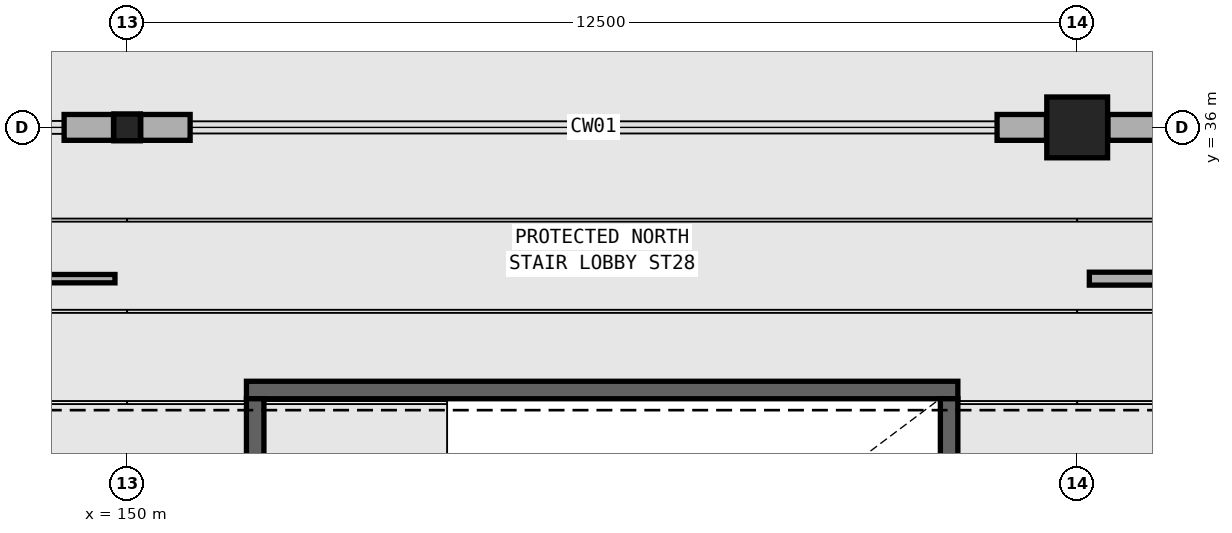
"""IFC4 building model, lengths in metres.
Left out: names, types, materials, properties, quantities, classifications, styles, units other than length and angle.
Written with IfcOpenShell. Run it as: python <this file> out.ifc"""

import sys

from ifc_helpers import new_model, si_unit, direction, frame, frame_2d, origin, origin_2d, place, context, subcontext, project, spatial, rectangle, hollow_rectangle, extrude, element, save


model = new_model("IFC4")
c1 = context("Model", 3, precision=1e-05, world=origin(), true_north=direction((0.0, 1.0)))
c2 = subcontext(c1, "Body", "Model", "MODEL_VIEW")
j1 = project(units=[si_unit("LENGTHUNIT", "METRE"), si_unit("PLANEANGLEUNIT", "RADIAN")], contexts=[c1])
p1 = place(None, origin())
s1 = spatial("IfcSite", under=j1, at=p1, CompositionType="ELEMENT")
p2 = place(p1, origin())
s2 = spatial("IfcBuilding", under=s1, at=p2, CompositionType="ELEMENT")
p3 = place(p2, frame((0.0, 0.0, 15.3)))
s3 = spatial("IfcBuildingStorey", under=s2, at=p3, CompositionType="ELEMENT", Elevation=15.3)
p4 = place(p3, frame((150.0, 36.0, 0.0), z_axis=(0.0, 0.0, 1.0), x_axis=(1.0, 0.0, 0.0)))
e1 = element("IfcColumn", 1, at=p4, inside=s3, PredefinedType="COLUMN", context=c2, shape_type="SweptSolid", body=[
    extrude(hollow_rectangle(XDim=0.35, YDim=0.35, WallThickness=0.016, InnerFilletRadius=0.016, OuterFilletRadius=0.032, at=origin_2d()), origin(), (0.0, 0.0, 1.0), 5.1),
])
p5 = place(p3, frame((162.5, 36.0, 0.0), z_axis=(0.0, 0.0, 1.0), x_axis=(1.0, 0.0, 0.0)))
e2 = element("IfcColumn", 2, at=p5, inside=s3, PredefinedType="COLUMN", context=c2, shape_type="SweptSolid", body=[
    extrude(rectangle(XDim=0.8, YDim=0.8, at=origin_2d()), origin(), (0.0, 0.0, 1.0), 5.1),
])
p6 = place(p3, frame((149.171, 36.0, 0.0), z_axis=(0.0, 0.0, 1.0), x_axis=(1.0, 0.0, 0.0)))
e3 = element("IfcWall", 3, at=p6, inside=s3, PredefinedType="SOLIDWALL", context=c2, shape_type="SweptSolid", body=[
    extrude(rectangle(XDim=0.65, YDim=0.34, at=frame_2d((0.325, 0.0))), origin(), (0.0, 0.0, 1.0), 4.172),
])
p7 = place(p3, frame((150.179, 36.0, 0.0), z_axis=(0.0, 0.0, 1.0), x_axis=(1.0, 0.0, 0.0)))
e4 = element("IfcWall", 4, at=p7, inside=s3, PredefinedType="SOLIDWALL", context=c2, shape_type="SweptSolid", body=[
    extrude(rectangle(XDim=0.65, YDim=0.34, at=frame_2d((0.325, 0.0))), origin(), (0.0, 0.0, 1.0), 4.06),
])
p8 = place(p3, frame((161.446, 36.0, 0.0), z_axis=(0.0, 0.0, 1.0), x_axis=(1.0, 0.0, 0.0)))
e5 = element("IfcWall", 5, at=p8, inside=s3, PredefinedType="SOLIDWALL", context=c2, shape_type="SweptSolid", body=[
    extrude(rectangle(XDim=0.65, YDim=0.34, at=frame_2d((0.325, 0.0))), origin(), (0.0, 0.0, 1.0), 4.06),
])
p9 = place(p3, frame((162.904, 36.0, 0.0), z_axis=(0.0, 0.0, 1.0), x_axis=(1.0, 0.0, 0.0)))
e6 = element("IfcWall", 6, at=p9, inside=s3, PredefinedType="SOLIDWALL", context=c2, shape_type="SweptSolid", body=[
    extrude(rectangle(XDim=0.65, YDim=0.34, at=frame_2d((0.325, 0.0))), origin(), (0.0, 0.0, 1.0), 4.16),
])
p10 = place(p3, frame((151.57, 32.545, 0.0), z_axis=(0.0, 0.0, 1.0), x_axis=(1.0, 0.0, 0.0)))
e7 = element("IfcWall", 7, at=p10, inside=s3, PredefinedType="SHEAR", context=c2, shape_type="SweptSolid", body=[
    extrude(rectangle(XDim=9.36, YDim=0.23, at=frame_2d((4.68, 0.0))), origin(), (0.0, 0.0, 1.0), 4.86),
])
for number, where, z_axis, x_axis in (
    (8, (151.685, 27.57, 0.0), (0.0, 0.0, 1.0), (0.0, 1.0, 0.0)),
    (9, (160.815, 27.57, 0.0), (0.0, 0.0, 1.0), (0.0, 1.0, 0.0)),
):
    element("IfcWall", number, at=place(p3, frame(where, z_axis=z_axis, x_axis=x_axis)), inside=s3, PredefinedType="SHEAR", context=c2, shape_type="SweptSolid", body=[
        extrude(rectangle(XDim=4.86, YDim=0.23, at=frame_2d((2.43, 0.0))), origin(), (0.0, 0.0, 1.0), 4.86),
    ])
p11 = place(p3, frame((139.42, 34.01, 0.0), z_axis=(0.0, 0.0, 1.0), x_axis=(1.0, 0.0, 0.0)))
e10 = element("IfcWall", 10, at=p11, inside=s3, PredefinedType="PARTITIONING", context=c2, shape_type="SweptSolid", body=[
    extrude(rectangle(XDim=10.42, YDim=0.11, at=frame_2d((5.21, 0.0))), origin(), (0.0, 0.0, 1.0), 2.77),
])
p12 = place(p11, frame((3.219, 0.0, 0.0), z_axis=(0.0, 0.0, 1.0), x_axis=(-1.0, 0.0, 0.0)))
e11 = element("IfcOpeningElement", 11, at=p12, cuts=e10, PredefinedType="OPENING", context=c2, shape_type="SweptSolid", body=[
    extrude(rectangle(XDim=1.36, YDim=2.25, at=frame_2d((0.68, 1.125))), frame((0.0, 0.065, 0.0), z_axis=(0.0, -1.0, 0.0), x_axis=(1.0, 0.0, 0.0)), (0.0, 0.0, 1.0), 0.13),
])
p13 = place(p11, frame((8.529, 0.0, 0.0), z_axis=(0.0, 0.0, 1.0), x_axis=(-1.0, 0.0, 0.0)))
e12 = element("IfcOpeningElement", 12, at=p13, cuts=e10, PredefinedType="OPENING", context=c2, shape_type="SweptSolid", body=[
    extrude(rectangle(XDim=1.4, YDim=2.24, at=frame_2d((0.7, 1.12))), frame((0.0, 0.065, 0.0), z_axis=(0.0, -1.0, 0.0), x_axis=(1.0, 0.0, 0.0)), (0.0, 0.0, 1.0), 0.13),
])
p14 = place(p3, frame((162.66, 34.01, 0.0), z_axis=(0.0, 0.0, 1.0), x_axis=(1.0, 0.0, 0.0)))
e13 = element("IfcWall", 13, at=p14, inside=s3, PredefinedType="PARTITIONING", context=c2, shape_type="SweptSolid", body=[
    extrude(rectangle(XDim=12.18, YDim=0.17, at=frame_2d((6.09, 0.0))), origin(), (0.0, 0.0, 1.0), 2.77),
])
p15 = place(p14, frame((6.97, 0.0, 0.0), z_axis=(0.0, 0.0, 1.0), x_axis=(-1.0, 0.0, 0.0)))
e14 = element("IfcOpeningElement", 14, at=p15, cuts=e13, PredefinedType="OPENING", context=c2, shape_type="SweptSolid", body=[
    extrude(rectangle(XDim=1.76, YDim=2.3, at=frame_2d((0.88, 1.15))), frame((0.0, 0.095, 0.0), z_axis=(0.0, -1.0, 0.0), x_axis=(1.0, 0.0, 0.0)), (0.0, 0.0, 1.0), 0.19),
])
save(model, sys.argv[1])
